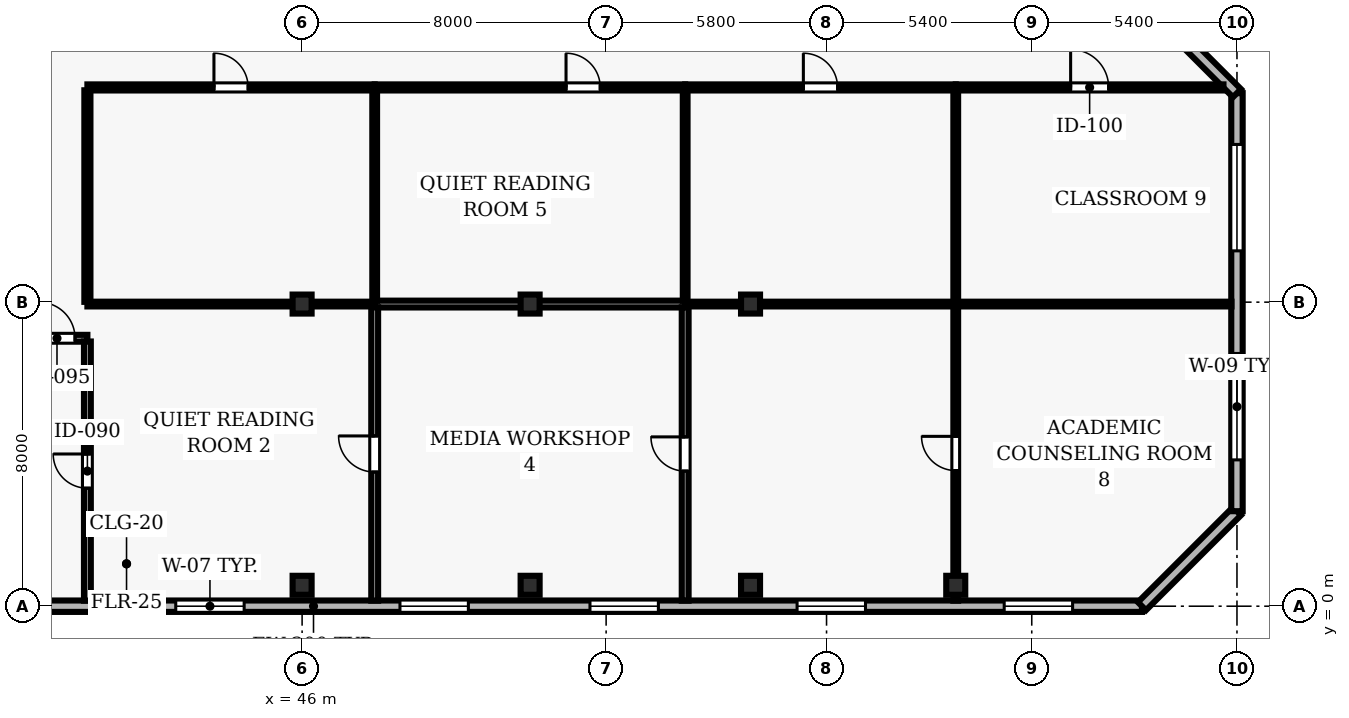
"""IFC4 building model, lengths in metres.
Left out: names, types, materials, properties, quantities, classifications, styles, units other than length and angle.
Written with IfcOpenShell. Run it as: python <this file> out.ifc"""

import sys

from ifc_helpers import new_model, si_unit, direction, frame, frame_2d, origin, origin_2d, place, context, subcontext, project, spatial, rectangle, hollow_rectangle, extrude, element, fill, save


model = new_model("IFC4")
c1 = context("Model", 3, precision=1e-05, world=origin(), true_north=direction((0.0, 1.0)))
c2 = subcontext(c1, "Body", "Model", "MODEL_VIEW")
j1 = project(units=[si_unit("LENGTHUNIT", "METRE"), si_unit("PLANEANGLEUNIT", "RADIAN")], contexts=[c1])
p1 = place(None, origin())
s1 = spatial("IfcSite", under=j1, at=p1, CompositionType="ELEMENT")
p2 = place(p1, origin())
s2 = spatial("IfcBuilding", under=s1, at=p2, CompositionType="ELEMENT")
p3 = place(p2, frame((0.0, 0.0, 126.8)))
s3 = spatial("IfcBuildingStorey", under=s2, at=p3, CompositionType="ELEMENT", Elevation=126.8)
for number, where, z_axis, x_axis in (
    (1, (46.0, 0.55, 0.0), (0.0, 0.0, 1.0), (1.0, 0.0, 0.0)),
    (2, (46.0, 7.95, 0.0), (0.0, 0.0, 1.0), (1.0, 0.0, 0.0)),
    (3, (52.0, 0.55, 0.0), (0.0, 0.0, 1.0), (1.0, 0.0, 0.0)),
    (4, (52.0, 7.95, 0.0), (0.0, 0.0, 1.0), (1.0, 0.0, 0.0)),
    (5, (57.8, 0.55, 0.0), (0.0, 0.0, 1.0), (1.0, 0.0, 0.0)),
    (6, (57.8, 7.95, 0.0), (0.0, 0.0, 1.0), (1.0, 0.0, 0.0)),
    (7, (63.2, 0.55, 0.0), (0.0, 0.0, 1.0), (1.0, 0.0, 0.0)),
):
    element("IfcColumn", number, at=place(p3, frame(where, z_axis=z_axis, x_axis=x_axis)), inside=s3, PredefinedType="COLUMN", context=c2, shape_type="SweptSolid", body=[
        extrude(hollow_rectangle(XDim=0.5, YDim=0.5, WallThickness=0.025, at=origin_2d()), origin(), (0.0, 0.0, 1.0), 3.9),
    ])
p4 = place(p3, frame((24.5, 0.0, 0.0), z_axis=(0.0, 0.0, 1.0), x_axis=(1.0, 0.0, 0.0)))
e8 = element("IfcWall", 8, at=p4, inside=s3, PredefinedType="SOLIDWALL", context=c2, shape_type="SweptSolid", body=[
    extrude(rectangle(XDim=43.6, YDim=0.3, at=frame_2d((21.8, 0.0))), origin(), (0.0, 0.0, 1.0), 3.69),
])
p5 = place(p4, frame((1.825, 0.0, 0.9)))
e9 = element("IfcOpeningElement", 9, at=p5, cuts=e8, PredefinedType="OPENING", context=c2, shape_type="SweptSolid", body=[
    extrude(rectangle(XDim=1.8, YDim=1.8, at=frame_2d((0.9, 0.9))), frame((0.0, 0.16, 0.0), z_axis=(0.0, -1.0, 0.0), x_axis=(1.0, 0.0, 0.0)), (0.0, 0.0, 1.0), 0.32),
])
p6 = place(p4, frame((8.175, 0.0, 0.9)))
e10 = element("IfcOpeningElement", 10, at=p6, cuts=e8, PredefinedType="OPENING", context=c2, shape_type="SweptSolid", body=[
    extrude(rectangle(XDim=1.8, YDim=1.8, at=frame_2d((0.9, 0.9))), frame((0.0, 0.16, 0.0), z_axis=(0.0, -1.0, 0.0), x_axis=(1.0, 0.0, 0.0)), (0.0, 0.0, 1.0), 0.32),
])
p7 = place(p4, frame((18.175, 0.0, 0.9)))
e11 = element("IfcOpeningElement", 11, at=p7, cuts=e8, PredefinedType="OPENING", context=c2, shape_type="SweptSolid", body=[
    extrude(rectangle(XDim=1.8, YDim=1.8, at=frame_2d((0.9, 0.9))), frame((0.0, 0.16, 0.0), z_axis=(0.0, -1.0, 0.0), x_axis=(1.0, 0.0, 0.0)), (0.0, 0.0, 1.0), 0.32),
])
p8 = place(p4, frame((24.075, 0.0, 0.9)))
e12 = element("IfcOpeningElement", 12, at=p8, cuts=e8, PredefinedType="OPENING", context=c2, shape_type="SweptSolid", body=[
    extrude(rectangle(XDim=1.8, YDim=1.8, at=frame_2d((0.9, 0.9))), frame((0.0, 0.16, 0.0), z_axis=(0.0, -1.0, 0.0), x_axis=(1.0, 0.0, 0.0)), (0.0, 0.0, 1.0), 0.32),
])
p9 = place(p4, frame((29.075, 0.0, 0.9)))
e13 = element("IfcOpeningElement", 13, at=p9, cuts=e8, PredefinedType="OPENING", context=c2, shape_type="SweptSolid", body=[
    extrude(rectangle(XDim=1.8, YDim=1.8, at=frame_2d((0.9, 0.9))), frame((0.0, 0.16, 0.0), z_axis=(0.0, -1.0, 0.0), x_axis=(1.0, 0.0, 0.0)), (0.0, 0.0, 1.0), 0.32),
])
p10 = place(p4, frame((34.525, 0.0, 0.9)))
e14 = element("IfcOpeningElement", 14, at=p10, cuts=e8, PredefinedType="OPENING", context=c2, shape_type="SweptSolid", body=[
    extrude(rectangle(XDim=1.8, YDim=1.8, at=frame_2d((0.9, 0.9))), frame((0.0, 0.16, 0.0), z_axis=(0.0, -1.0, 0.0), x_axis=(1.0, 0.0, 0.0)), (0.0, 0.0, 1.0), 0.32),
])
p11 = place(p4, frame((39.975, 0.0, 0.9)))
e15 = element("IfcOpeningElement", 15, at=p11, cuts=e8, PredefinedType="OPENING", context=c2, shape_type="SweptSolid", body=[
    extrude(rectangle(XDim=1.8, YDim=1.8, at=frame_2d((0.9, 0.9))), frame((0.0, 0.16, 0.0), z_axis=(0.0, -1.0, 0.0), x_axis=(1.0, 0.0, 0.0)), (0.0, 0.0, 1.0), 0.32),
])
p12 = place(p3, frame((68.1, 0.0, 0.0), z_axis=(0.0, 0.0, 1.0), x_axis=(0.707106781187, 0.707106781187, 0.0)))
e16 = element("IfcWall", 16, at=p12, inside=s3, PredefinedType="SOLIDWALL", context=c2, shape_type="SweptSolid", body=[
    extrude(rectangle(XDim=3.536, YDim=0.3, at=frame_2d((1.768, 0.0))), origin(), (0.0, 0.0, 1.0), 3.69),
])
p13 = place(p3, frame((70.6, 2.5, 0.0), z_axis=(0.0, 0.0, 1.0), x_axis=(0.0, 1.0, 0.0)))
e17 = element("IfcWall", 17, at=p13, inside=s3, PredefinedType="SOLIDWALL", context=c2, shape_type="SweptSolid", body=[
    extrude(rectangle(XDim=11.0, YDim=0.3, at=frame_2d((5.5, 0.0))), origin(), (0.0, 0.0, 1.0), 3.69),
])
p14 = place(p13, frame((1.35, 0.0, 0.9)))
e18 = element("IfcOpeningElement", 18, at=p14, cuts=e17, PredefinedType="OPENING", context=c2, shape_type="SweptSolid", body=[
    extrude(rectangle(XDim=2.8, YDim=1.8, at=frame_2d((1.4, 0.9))), frame((0.0, 0.16, 0.0), z_axis=(0.0, -1.0, 0.0), x_axis=(1.0, 0.0, 0.0)), (0.0, 0.0, 1.0), 0.32),
])
p15 = place(p13, frame((6.85, 0.0, 0.9)))
e19 = element("IfcOpeningElement", 19, at=p15, cuts=e17, PredefinedType="OPENING", context=c2, shape_type="SweptSolid", body=[
    extrude(rectangle(XDim=2.8, YDim=1.8, at=frame_2d((1.4, 0.9))), frame((0.0, 0.16, 0.0), z_axis=(0.0, -1.0, 0.0), x_axis=(1.0, 0.0, 0.0)), (0.0, 0.0, 1.0), 0.32),
])
p16 = place(p3, frame((70.6, 13.5, 0.0), z_axis=(0.0, 0.0, 1.0), x_axis=(-0.707106781187, 0.707106781187, 0.0)))
e20 = element("IfcWall", 20, at=p16, inside=s3, PredefinedType="SOLIDWALL", context=c2, shape_type="SweptSolid", body=[
    extrude(rectangle(XDim=3.536, YDim=0.3, at=frame_2d((1.768, 0.0))), origin(), (0.0, 0.0, 1.0), 3.69),
])
p17 = place(p3, frame((38.05, 7.05, 0.0), z_axis=(0.0, 0.0, 1.0), x_axis=(1.0, 0.0, 0.0)))
e21 = element("IfcWall", 21, at=p17, inside=s3, PredefinedType="PARTITIONING", context=c2, shape_type="SweptSolid", body=[
    extrude(rectangle(XDim=2.3, YDim=0.18, at=frame_2d((1.15, 0.0))), origin(), (0.0, 0.0, 1.0), 3.69),
])
p18 = place(p17, frame((1.025, 0.0, 0.0)))
e22 = element("IfcOpeningElement", 22, at=p18, cuts=e21, PredefinedType="OPENING", context=c2, shape_type="SweptSolid", body=[
    extrude(rectangle(XDim=0.95, YDim=2.1, at=frame_2d((0.475, 1.05))), frame((0.0, 0.1, 0.0), z_axis=(0.0, -1.0, 0.0), x_axis=(1.0, 0.0, 0.0)), (0.0, 0.0, 1.0), 0.2),
])
p19 = place(p3, frame((40.35, 13.65, 0.0), z_axis=(0.0, 0.0, 1.0), x_axis=(1.0, 0.0, 0.0)))
e23 = element("IfcWall", 23, at=p19, inside=s3, PredefinedType="PARTITIONING", context=c2, shape_type="SweptSolid", body=[
    extrude(rectangle(XDim=7.56, YDim=0.16, at=frame_2d((3.78, 0.0))), origin(), (0.0, 0.0, 1.0), 3.69),
])
p20 = place(p19, frame((3.33, 0.0, 0.0)))
e24 = element("IfcOpeningElement", 24, at=p20, cuts=e23, PredefinedType="OPENING", context=c2, shape_type="SweptSolid", body=[
    extrude(rectangle(XDim=0.9, YDim=2.1, at=frame_2d((0.45, 1.05))), frame((0.0, 0.09, 0.0), z_axis=(0.0, -1.0, 0.0), x_axis=(1.0, 0.0, 0.0)), (0.0, 0.0, 1.0), 0.18),
])
p21 = place(p3, frame((47.91, 7.95, 0.0), z_axis=(0.0, 0.0, 1.0), x_axis=(-1.0, 0.0, 0.0)))
e25 = element("IfcWall", 25, at=p21, inside=s3, PredefinedType="PARTITIONING", context=c2, shape_type="SweptSolid", body=[
    extrude(rectangle(XDim=7.56, YDim=0.125, at=frame_2d((3.78, 0.0))), origin(), (0.0, 0.0, 1.0), 3.074),
])
p22 = place(p3, frame((47.91, 13.65, 0.0), z_axis=(0.0, 0.0, 1.0), x_axis=(1.0, 0.0, 0.0)))
e26 = element("IfcWall", 26, at=p22, inside=s3, PredefinedType="PARTITIONING", context=c2, shape_type="SweptSolid", body=[
    extrude(rectangle(XDim=8.17, YDim=0.16, at=frame_2d((4.085, 0.0))), origin(), (0.0, 0.0, 1.0), 3.69),
])
p23 = place(p22, frame((5.035, 0.0, 0.0)))
e27 = element("IfcOpeningElement", 27, at=p23, cuts=e26, PredefinedType="OPENING", context=c2, shape_type="SweptSolid", body=[
    extrude(rectangle(XDim=0.9, YDim=2.1, at=frame_2d((0.45, 1.05))), frame((0.0, 0.09, 0.0), z_axis=(0.0, -1.0, 0.0), x_axis=(1.0, 0.0, 0.0)), (0.0, 0.0, 1.0), 0.18),
])
p24 = place(p3, frame((56.08, 7.95, 0.0), z_axis=(0.0, 0.0, 1.0), x_axis=(-1.0, 0.0, 0.0)))
e28 = element("IfcWall", 28, at=p24, inside=s3, PredefinedType="PARTITIONING", context=c2, shape_type="SweptSolid", body=[
    extrude(rectangle(XDim=8.17, YDim=0.18, at=frame_2d((4.085, 0.0))), origin(), (0.0, 0.0, 1.0), 3.074),
])
p25 = place(p3, frame((56.08, 13.65, 0.0), z_axis=(0.0, 0.0, 1.0), x_axis=(1.0, 0.0, 0.0)))
e29 = element("IfcWall", 29, at=p25, inside=s3, PredefinedType="PARTITIONING", context=c2, shape_type="SweptSolid", body=[
    extrude(rectangle(XDim=7.12, YDim=0.16, at=frame_2d((3.56, 0.0))), origin(), (0.0, 0.0, 1.0), 3.69),
])
p26 = place(p25, frame((3.11, 0.0, 0.0)))
e30 = element("IfcOpeningElement", 30, at=p26, cuts=e29, PredefinedType="OPENING", context=c2, shape_type="SweptSolid", body=[
    extrude(rectangle(XDim=0.9, YDim=2.1, at=frame_2d((0.45, 1.05))), frame((0.0, 0.09, 0.0), z_axis=(0.0, -1.0, 0.0), x_axis=(1.0, 0.0, 0.0)), (0.0, 0.0, 1.0), 0.18),
])
p27 = place(p3, frame((63.2, 7.95, 0.0), z_axis=(0.0, 0.0, 1.0), x_axis=(-1.0, 0.0, 0.0)))
e31 = element("IfcWall", 31, at=p27, inside=s3, PredefinedType="PARTITIONING", context=c2, shape_type="SweptSolid", body=[
    extrude(rectangle(XDim=7.12, YDim=0.125, at=frame_2d((3.56, 0.0))), origin(), (0.0, 0.0, 1.0), 3.074),
])
p28 = place(p3, frame((63.2, 13.65, 0.0), z_axis=(0.0, 0.0, 1.0), x_axis=(1.0, 0.0, 0.0)))
e32 = element("IfcWall", 32, at=p28, inside=s3, PredefinedType="PARTITIONING", context=c2, shape_type="SweptSolid", body=[
    extrude(rectangle(XDim=7.045, YDim=0.16, at=frame_2d((3.522, 0.0))), origin(), (0.0, 0.0, 1.0), 3.69),
])
p29 = place(p28, frame((3.023, 0.0, 0.0)))
e33 = element("IfcOpeningElement", 33, at=p29, cuts=e32, PredefinedType="OPENING", context=c2, shape_type="SweptSolid", body=[
    extrude(rectangle(XDim=1.0, YDim=2.1, at=frame_2d((0.5, 1.05))), frame((0.0, 0.09, 0.0), z_axis=(0.0, -1.0, 0.0), x_axis=(1.0, 0.0, 0.0)), (0.0, 0.0, 1.0), 0.18),
])
p30 = place(p3, frame((70.455, 7.95, 0.0), z_axis=(0.0, 0.0, 1.0), x_axis=(-1.0, 0.0, 0.0)))
e34 = element("IfcWall", 34, at=p30, inside=s3, PredefinedType="PARTITIONING", context=c2, shape_type="SweptSolid", body=[
    extrude(rectangle(XDim=7.255, YDim=0.125, at=frame_2d((3.627, 0.0))), origin(), (0.0, 0.0, 1.0), 3.69),
])
p31 = place(p3, frame((40.35, 0.145, 0.0), z_axis=(0.0, 0.0, 1.0), x_axis=(0.0, 1.0, 0.0)))
e35 = element("IfcWall", 35, at=p31, inside=s3, PredefinedType="PARTITIONING", context=c2, shape_type="SweptSolid", body=[
    extrude(rectangle(XDim=6.82, YDim=0.18, at=frame_2d((3.41, 0.0))), origin(), (0.0, 0.0, 1.0), 3.69),
])
p32 = place(p31, frame((2.96, 0.0, 0.0)))
e36 = element("IfcOpeningElement", 36, at=p32, cuts=e35, PredefinedType="OPENING", context=c2, shape_type="SweptSolid", body=[
    extrude(rectangle(XDim=0.9, YDim=2.1, at=frame_2d((0.45, 1.05))), frame((0.0, 0.1, 0.0), z_axis=(0.0, -1.0, 0.0), x_axis=(1.0, 0.0, 0.0)), (0.0, 0.0, 1.0), 0.2),
])
p33 = place(p3, frame((40.35, 8.008, 0.0), z_axis=(0.0, 0.0, 1.0), x_axis=(0.0, 1.0, 0.0)))
e37 = element("IfcWall", 37, at=p33, inside=s3, PredefinedType="PARTITIONING", context=c2, shape_type="SweptSolid", body=[
    extrude(rectangle(XDim=5.567, YDim=0.16, at=frame_2d((2.783, 0.0))), origin(), (0.0, 0.0, 1.0), 3.69),
])
p34 = place(p3, frame((47.91, 0.145, 0.0), z_axis=(0.0, 0.0, 1.0), x_axis=(0.0, 1.0, 0.0)))
e38 = element("IfcWall", 38, at=p34, inside=s3, PredefinedType="PARTITIONING", context=c2, shape_type="SweptSolid", body=[
    extrude(rectangle(XDim=7.72, YDim=0.18, at=frame_2d((3.86, 0.0))), origin(), (0.0, 0.0, 1.0), 3.69),
])
p35 = place(p34, frame((3.385, 0.0, 0.0)))
e39 = element("IfcOpeningElement", 39, at=p35, cuts=e38, PredefinedType="OPENING", context=c2, shape_type="SweptSolid", body=[
    extrude(rectangle(XDim=0.95, YDim=2.1, at=frame_2d((0.475, 1.05))), frame((0.0, 0.1, 0.0), z_axis=(0.0, -1.0, 0.0), x_axis=(1.0, 0.0, 0.0)), (0.0, 0.0, 1.0), 0.2),
])
p36 = place(p3, frame((47.91, 8.035, 0.0), z_axis=(0.0, 0.0, 1.0), x_axis=(0.0, 1.0, 0.0)))
e40 = element("IfcWall", 40, at=p36, inside=s3, PredefinedType="PARTITIONING", context=c2, shape_type="SweptSolid", body=[
    extrude(rectangle(XDim=5.54, YDim=0.125, at=frame_2d((2.77, 0.0))), origin(), (0.0, 0.0, 1.0), 3.69),
])
p37 = place(p3, frame((56.08, 0.145, 0.0), z_axis=(0.0, 0.0, 1.0), x_axis=(0.0, 1.0, 0.0)))
e41 = element("IfcWall", 41, at=p37, inside=s3, PredefinedType="PARTITIONING", context=c2, shape_type="SweptSolid", body=[
    extrude(rectangle(XDim=7.72, YDim=0.18, at=frame_2d((3.86, 0.0))), origin(), (0.0, 0.0, 1.0), 3.69),
])
p38 = place(p37, frame((3.41, 0.0, 0.0)))
e42 = element("IfcOpeningElement", 42, at=p38, cuts=e41, PredefinedType="OPENING", context=c2, shape_type="SweptSolid", body=[
    extrude(rectangle(XDim=0.9, YDim=2.1, at=frame_2d((0.45, 1.05))), frame((0.0, 0.1, 0.0), z_axis=(0.0, -1.0, 0.0), x_axis=(1.0, 0.0, 0.0)), (0.0, 0.0, 1.0), 0.2),
])
p39 = place(p3, frame((56.08, 8.035, 0.0), z_axis=(0.0, 0.0, 1.0), x_axis=(0.0, 1.0, 0.0)))
e43 = element("IfcWall", 43, at=p39, inside=s3, PredefinedType="PARTITIONING", context=c2, shape_type="SweptSolid", body=[
    extrude(rectangle(XDim=5.54, YDim=0.125, at=frame_2d((2.77, 0.0))), origin(), (0.0, 0.0, 1.0), 3.69),
])
p40 = place(p3, frame((63.2, 0.145, 0.0), z_axis=(0.0, 0.0, 1.0), x_axis=(0.0, 1.0, 0.0)))
e44 = element("IfcWall", 44, at=p40, inside=s3, PredefinedType="PARTITIONING", context=c2, shape_type="SweptSolid", body=[
    extrude(rectangle(XDim=7.748, YDim=0.125, at=frame_2d((3.874, 0.0))), origin(), (0.0, 0.0, 1.0), 3.074),
])
p41 = place(p40, frame((3.424, 0.0, 0.0)))
e45 = element("IfcOpeningElement", 45, at=p41, cuts=e44, PredefinedType="OPENING", context=c2, shape_type="SweptSolid", body=[
    extrude(rectangle(XDim=0.9, YDim=2.1, at=frame_2d((0.45, 1.05))), frame((0.0, 0.073, 0.0), z_axis=(0.0, -1.0, 0.0), x_axis=(1.0, 0.0, 0.0)), (0.0, 0.0, 1.0), 0.145),
])
p42 = place(p3, frame((63.2, 8.008, 0.0), z_axis=(0.0, 0.0, 1.0), x_axis=(0.0, 1.0, 0.0)))
e46 = element("IfcWall", 46, at=p42, inside=s3, PredefinedType="PARTITIONING", context=c2, shape_type="SweptSolid", body=[
    extrude(rectangle(XDim=5.567, YDim=0.125, at=frame_2d((2.783, 0.0))), origin(), (0.0, 0.0, 1.0), 3.074),
])
p43 = place(p7, origin())
e47 = element("IfcWindow", 47, at=p43, inside=s3, PartitioningType="SINGLE_PANEL", PredefinedType="WINDOW", context=c2, shape_type="SweptSolid", body=[
    extrude(rectangle(XDim=1.8, YDim=1.8, at=frame_2d((0.9, 0.9))), frame((0.0, 0.03, 0.0), z_axis=(0.0, -1.0, 0.0), x_axis=(1.0, 0.0, 0.0)), (0.0, 0.0, 1.0), 0.06),
])
fill(e11, e47)
p44 = place(p8, origin())
e48 = element("IfcWindow", 48, at=p44, inside=s3, PartitioningType="SINGLE_PANEL", PredefinedType="WINDOW", context=c2, shape_type="SweptSolid", body=[
    extrude(rectangle(XDim=1.8, YDim=1.8, at=frame_2d((0.9, 0.9))), frame((0.0, 0.03, 0.0), z_axis=(0.0, -1.0, 0.0), x_axis=(1.0, 0.0, 0.0)), (0.0, 0.0, 1.0), 0.06),
])
fill(e12, e48)
p45 = place(p9, origin())
e49 = element("IfcWindow", 49, at=p45, inside=s3, PartitioningType="SINGLE_PANEL", PredefinedType="WINDOW", context=c2, shape_type="SweptSolid", body=[
    extrude(rectangle(XDim=1.8, YDim=1.8, at=frame_2d((0.9, 0.9))), frame((0.0, 0.03, 0.0), z_axis=(0.0, -1.0, 0.0), x_axis=(1.0, 0.0, 0.0)), (0.0, 0.0, 1.0), 0.06),
])
fill(e13, e49)
p46 = place(p10, origin())
e50 = element("IfcWindow", 50, at=p46, inside=s3, PartitioningType="SINGLE_PANEL", PredefinedType="WINDOW", context=c2, shape_type="SweptSolid", body=[
    extrude(rectangle(XDim=1.8, YDim=1.8, at=frame_2d((0.9, 0.9))), frame((0.0, 0.03, 0.0), z_axis=(0.0, -1.0, 0.0), x_axis=(1.0, 0.0, 0.0)), (0.0, 0.0, 1.0), 0.06),
])
fill(e14, e50)
p47 = place(p11, origin())
e51 = element("IfcWindow", 51, at=p47, inside=s3, PartitioningType="SINGLE_PANEL", PredefinedType="WINDOW", context=c2, shape_type="SweptSolid", body=[
    extrude(rectangle(XDim=1.8, YDim=1.8, at=frame_2d((0.9, 0.9))), frame((0.0, 0.03, 0.0), z_axis=(0.0, -1.0, 0.0), x_axis=(1.0, 0.0, 0.0)), (0.0, 0.0, 1.0), 0.06),
])
fill(e15, e51)
p48 = place(p14, origin())
e52 = element("IfcWindow", 52, at=p48, inside=s3, PartitioningType="SINGLE_PANEL", PredefinedType="WINDOW", context=c2, shape_type="SweptSolid", body=[
    extrude(rectangle(XDim=2.8, YDim=1.8, at=frame_2d((1.4, 0.9))), frame((0.0, 0.03, 0.0), z_axis=(0.0, -1.0, 0.0), x_axis=(1.0, 0.0, 0.0)), (0.0, 0.0, 1.0), 0.06),
])
fill(e18, e52)
p49 = place(p15, origin())
e53 = element("IfcWindow", 53, at=p49, inside=s3, PartitioningType="SINGLE_PANEL", PredefinedType="WINDOW", context=c2, shape_type="SweptSolid", body=[
    extrude(rectangle(XDim=2.8, YDim=1.8, at=frame_2d((1.4, 0.9))), frame((0.0, 0.03, 0.0), z_axis=(0.0, -1.0, 0.0), x_axis=(1.0, 0.0, 0.0)), (0.0, 0.0, 1.0), 0.06),
])
fill(e19, e53)
p50 = place(p18, origin())
e54 = element("IfcDoor", 54, at=p50, inside=s3, OperationType="SINGLE_SWING_LEFT", PredefinedType="DOOR", context=c2, shape_type="SweptSolid", body=[
    extrude(rectangle(XDim=0.95, YDim=2.1, at=frame_2d((0.475, 1.05))), frame((0.0, 0.025, 0.0), z_axis=(0.0, -1.0, 0.0), x_axis=(1.0, 0.0, 0.0)), (0.0, 0.0, 1.0), 0.05),
])
fill(e22, e54)
p51 = place(p32, origin())
e55 = element("IfcDoor", 55, at=p51, inside=s3, OperationType="SINGLE_SWING_RIGHT", PredefinedType="DOOR", context=c2, shape_type="SweptSolid", body=[
    extrude(rectangle(XDim=0.9, YDim=2.1, at=frame_2d((0.45, 1.05))), frame((0.0, 0.025, 0.0), z_axis=(0.0, -1.0, 0.0), x_axis=(1.0, 0.0, 0.0)), (0.0, 0.0, 1.0), 0.05),
])
fill(e36, e55)
p52 = place(p20, origin())
e56 = element("IfcDoor", 56, at=p52, inside=s3, OperationType="SINGLE_SWING_LEFT", PredefinedType="DOOR", context=c2, shape_type="SweptSolid", body=[
    extrude(rectangle(XDim=0.9, YDim=2.1, at=frame_2d((0.45, 1.05))), frame((0.0, 0.025, 0.0), z_axis=(0.0, -1.0, 0.0), x_axis=(1.0, 0.0, 0.0)), (0.0, 0.0, 1.0), 0.05),
])
fill(e24, e56)
p53 = place(p35, origin())
e57 = element("IfcDoor", 57, at=p53, inside=s3, OperationType="SINGLE_SWING_RIGHT", PredefinedType="DOOR", context=c2, shape_type="SweptSolid", body=[
    extrude(rectangle(XDim=0.95, YDim=2.1, at=frame_2d((0.475, 1.05))), frame((0.0, 0.025, 0.0), z_axis=(0.0, -1.0, 0.0), x_axis=(1.0, 0.0, 0.0)), (0.0, 0.0, 1.0), 0.05),
])
fill(e39, e57)
p54 = place(p23, origin())
e58 = element("IfcDoor", 58, at=p54, inside=s3, OperationType="SINGLE_SWING_LEFT", PredefinedType="DOOR", context=c2, shape_type="SweptSolid", body=[
    extrude(rectangle(XDim=0.9, YDim=2.1, at=frame_2d((0.45, 1.05))), frame((0.0, 0.025, 0.0), z_axis=(0.0, -1.0, 0.0), x_axis=(1.0, 0.0, 0.0)), (0.0, 0.0, 1.0), 0.05),
])
fill(e27, e58)
p55 = place(p38, origin())
e59 = element("IfcDoor", 59, at=p55, inside=s3, OperationType="SINGLE_SWING_RIGHT", PredefinedType="DOOR", context=c2, shape_type="SweptSolid", body=[
    extrude(rectangle(XDim=0.9, YDim=2.1, at=frame_2d((0.45, 1.05))), frame((0.0, 0.025, 0.0), z_axis=(0.0, -1.0, 0.0), x_axis=(1.0, 0.0, 0.0)), (0.0, 0.0, 1.0), 0.05),
])
fill(e42, e59)
p56 = place(p26, origin())
e60 = element("IfcDoor", 60, at=p56, inside=s3, OperationType="SINGLE_SWING_LEFT", PredefinedType="DOOR", context=c2, shape_type="SweptSolid", body=[
    extrude(rectangle(XDim=0.9, YDim=2.1, at=frame_2d((0.45, 1.05))), frame((0.0, 0.025, 0.0), z_axis=(0.0, -1.0, 0.0), x_axis=(1.0, 0.0, 0.0)), (0.0, 0.0, 1.0), 0.05),
])
fill(e30, e60)
p57 = place(p41, origin())
e61 = element("IfcDoor", 61, at=p57, inside=s3, OperationType="SINGLE_SWING_RIGHT", PredefinedType="DOOR", context=c2, shape_type="SweptSolid", body=[
    extrude(rectangle(XDim=0.9, YDim=2.1, at=frame_2d((0.45, 1.05))), frame((0.0, 0.025, 0.0), z_axis=(0.0, -1.0, 0.0), x_axis=(1.0, 0.0, 0.0)), (0.0, 0.0, 1.0), 0.05),
])
fill(e45, e61)
p58 = place(p29, origin())
e62 = element("IfcDoor", 62, at=p58, inside=s3, OperationType="SINGLE_SWING_LEFT", PredefinedType="DOOR", context=c2, shape_type="SweptSolid", body=[
    extrude(rectangle(XDim=1.0, YDim=2.1, at=frame_2d((0.5, 1.05))), frame((0.0, 0.025, 0.0), z_axis=(0.0, -1.0, 0.0), x_axis=(1.0, 0.0, 0.0)), (0.0, 0.0, 1.0), 0.05),
])
fill(e33, e62)
save(model, sys.argv[1])
